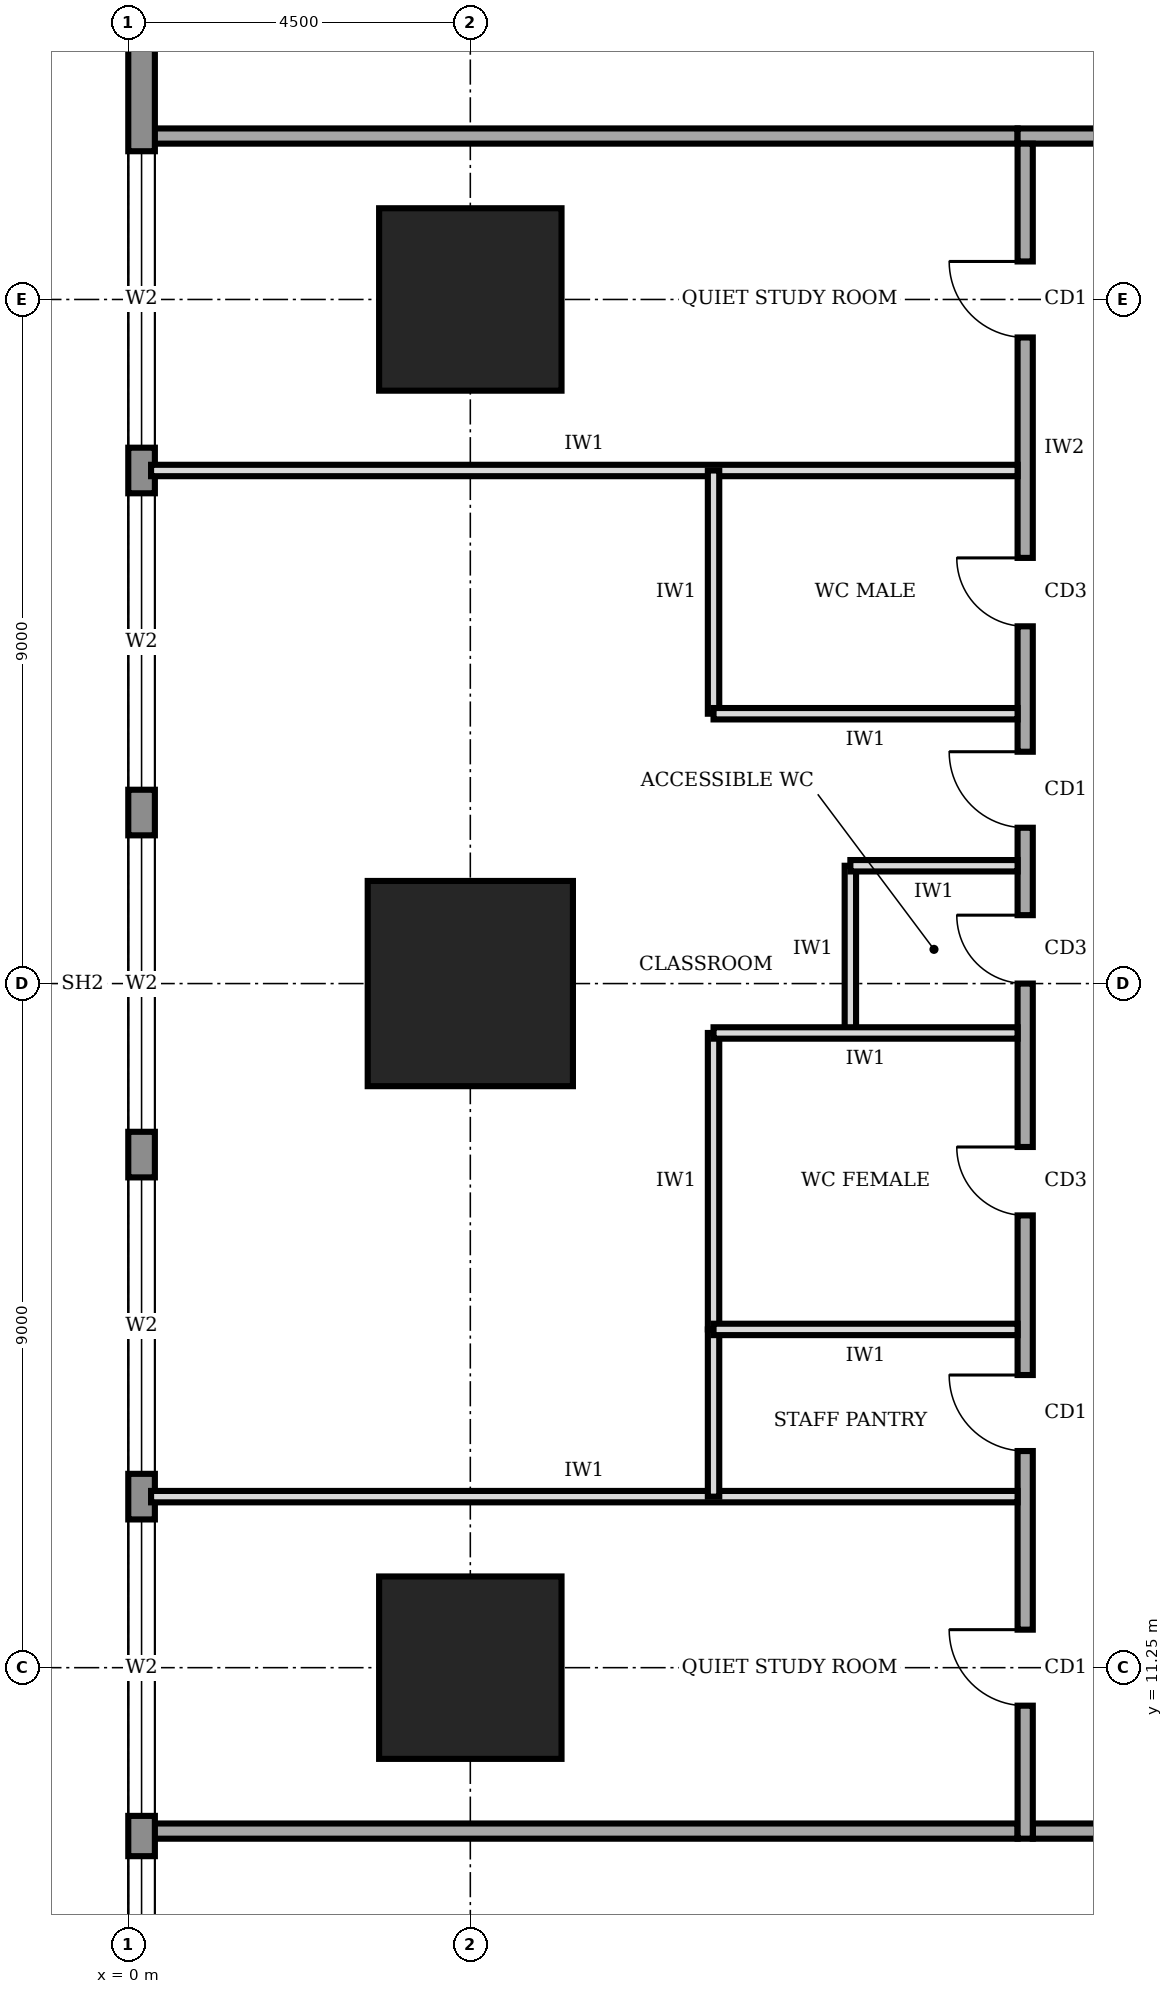
"""IFC4 building model, lengths in metres.
Left out: names, types, materials, properties, quantities, classifications, styles, units other than length and angle.
Written with IfcOpenShell. Run it as: python <this file> out.ifc"""

import sys

from ifc_helpers import new_model, si_unit, direction, frame, frame_2d, origin, origin_2d, place, context, subcontext, project, spatial, rectangle, extrude, element, fill, save


model = new_model("IFC4")
c1 = context("Model", 3, precision=1e-05, world=origin(), true_north=direction((0.0, 1.0)))
c2 = subcontext(c1, "Body", "Model", "MODEL_VIEW")
j1 = project(units=[si_unit("LENGTHUNIT", "METRE"), si_unit("PLANEANGLEUNIT", "RADIAN")], contexts=[c1])
p1 = place(None, origin())
s1 = spatial("IfcSite", under=j1, at=p1, CompositionType="ELEMENT")
p2 = place(p1, origin())
s2 = spatial("IfcBuilding", under=s1, at=p2, CompositionType="ELEMENT")
p3 = place(p2, frame((0.0, 0.0, 61.0)))
s3 = spatial("IfcBuildingStorey", under=s2, at=p3, CompositionType="ELEMENT", Elevation=61.0)
p4 = place(p3, frame((4.5, 11.25, 0.0), z_axis=(0.0, 0.0, 1.0), x_axis=(1.0, 0.0, 0.0)))
e1 = element("IfcColumn", 1, at=p4, inside=s3, PredefinedType="COLUMN", context=c2, shape_type="SweptSolid", body=[
    extrude(rectangle(XDim=2.4, YDim=2.4, at=origin_2d()), origin(), (0.0, 0.0, 1.0), 4.0),
])
p5 = place(p3, frame((4.5, 20.25, 0.0), z_axis=(0.0, 0.0, 1.0), x_axis=(1.0, 0.0, 0.0)))
e2 = element("IfcColumn", 2, at=p5, inside=s3, PredefinedType="COLUMN", context=c2, shape_type="SweptSolid", body=[
    extrude(rectangle(XDim=2.7, YDim=2.7, at=origin_2d()), origin(), (0.0, 0.0, 1.0), 4.0),
])
p6 = place(p3, frame((4.5, 29.25, 0.0), z_axis=(0.0, 0.0, 1.0), x_axis=(1.0, 0.0, 0.0)))
e3 = element("IfcColumn", 3, at=p6, inside=s3, PredefinedType="COLUMN", context=c2, shape_type="SweptSolid", body=[
    extrude(rectangle(XDim=2.4, YDim=2.4, at=origin_2d()), origin(), (0.0, 0.0, 1.0), 4.0),
])
p7 = place(p3, frame((0.175, 35.98, 0.0), z_axis=(0.0, 0.0, 1.0), x_axis=(0.0, -1.0, 0.0)))
e4 = element("IfcWall", 4, at=p7, inside=s3, PredefinedType="STANDARD", context=c2, shape_type="SweptSolid", body=[
    extrude(rectangle(XDim=31.46, YDim=0.35, at=frame_2d((15.73, 0.0))), origin(), (0.0, 0.0, 1.0), 3.75),
])
p8 = place(p7, frame((27.21, 0.0, 0.6)))
e5 = element("IfcOpeningElement", 5, at=p8, cuts=e4, PredefinedType="OPENING", context=c2, shape_type="SweptSolid", body=[
    extrude(rectangle(XDim=3.9, YDim=2.6, at=frame_2d((1.95, 1.3))), frame((0.0, 0.185, 0.0), z_axis=(0.0, -1.0, 0.0), x_axis=(1.0, 0.0, 0.0)), (0.0, 0.0, 1.0), 0.37),
])
p9 = place(p7, frame((22.78, 0.0, 0.6)))
e6 = element("IfcOpeningElement", 6, at=p9, cuts=e4, PredefinedType="OPENING", context=c2, shape_type="SweptSolid", body=[
    extrude(rectangle(XDim=3.9, YDim=2.6, at=frame_2d((1.95, 1.3))), frame((0.0, 0.185, 0.0), z_axis=(0.0, -1.0, 0.0), x_axis=(1.0, 0.0, 0.0)), (0.0, 0.0, 1.0), 0.37),
])
p10 = place(p7, frame((18.28, 0.0, 0.6)))
e7 = element("IfcOpeningElement", 7, at=p10, cuts=e4, PredefinedType="OPENING", context=c2, shape_type="SweptSolid", body=[
    extrude(rectangle(XDim=3.9, YDim=2.6, at=frame_2d((1.95, 1.3))), frame((0.0, 0.185, 0.0), z_axis=(0.0, -1.0, 0.0), x_axis=(1.0, 0.0, 0.0)), (0.0, 0.0, 1.0), 0.37),
])
p11 = place(p7, frame((13.78, 0.0, 0.6)))
e8 = element("IfcOpeningElement", 8, at=p11, cuts=e4, PredefinedType="OPENING", context=c2, shape_type="SweptSolid", body=[
    extrude(rectangle(XDim=3.9, YDim=2.6, at=frame_2d((1.95, 1.3))), frame((0.0, 0.185, 0.0), z_axis=(0.0, -1.0, 0.0), x_axis=(1.0, 0.0, 0.0)), (0.0, 0.0, 1.0), 0.37),
])
p12 = place(p7, frame((9.28, 0.0, 0.6)))
e9 = element("IfcOpeningElement", 9, at=p12, cuts=e4, PredefinedType="OPENING", context=c2, shape_type="SweptSolid", body=[
    extrude(rectangle(XDim=3.9, YDim=2.6, at=frame_2d((1.95, 1.3))), frame((0.0, 0.185, 0.0), z_axis=(0.0, -1.0, 0.0), x_axis=(1.0, 0.0, 0.0)), (0.0, 0.0, 1.0), 0.37),
])
p13 = place(p7, frame((4.78, 0.0, 0.6)))
e10 = element("IfcOpeningElement", 10, at=p13, cuts=e4, PredefinedType="OPENING", context=c2, shape_type="SweptSolid", body=[
    extrude(rectangle(XDim=3.9, YDim=2.6, at=frame_2d((1.95, 1.3))), frame((0.0, 0.185, 0.0), z_axis=(0.0, -1.0, 0.0), x_axis=(1.0, 0.0, 0.0)), (0.0, 0.0, 1.0), 0.37),
])
p14 = place(p3, frame((11.9, 9.1, 0.0), z_axis=(0.0, 0.0, 1.0), x_axis=(1.0, 0.0, 0.0)))
e11 = element("IfcWall", 11, at=p14, inside=s3, PredefinedType="SOLIDWALL", context=c2, shape_type="SweptSolid", body=[
    extrude(rectangle(XDim=18.4, YDim=0.2, at=frame_2d((9.2, 0.0))), origin(), (0.0, 0.0, 1.0), 3.75),
])
p15 = place(p14, frame((2.25, 0.0, 0.0)))
e12 = element("IfcOpeningElement", 12, at=p15, cuts=e11, PredefinedType="OPENING", context=c2, shape_type="SweptSolid", body=[
    extrude(rectangle(XDim=1.4, YDim=2.1, at=frame_2d((0.7, 1.05))), frame((0.0, 0.11, 0.0), z_axis=(0.0, -1.0, 0.0), x_axis=(1.0, 0.0, 0.0)), (0.0, 0.0, 1.0), 0.22),
])
p16 = place(p14, frame((7.85, 0.0, 0.0)))
e13 = element("IfcOpeningElement", 13, at=p16, cuts=e11, PredefinedType="OPENING", context=c2, shape_type="SweptSolid", body=[
    extrude(rectangle(XDim=1.0, YDim=2.1, at=frame_2d((0.5, 1.05))), frame((0.0, 0.11, 0.0), z_axis=(0.0, -1.0, 0.0), x_axis=(1.0, 0.0, 0.0)), (0.0, 0.0, 1.0), 0.22),
])
p17 = place(p14, frame((13.8, 0.0, 0.0)))
e14 = element("IfcOpeningElement", 14, at=p17, cuts=e11, PredefinedType="OPENING", context=c2, shape_type="SweptSolid", body=[
    extrude(rectangle(XDim=1.4, YDim=2.1, at=frame_2d((0.7, 1.05))), frame((0.0, 0.11, 0.0), z_axis=(0.0, -1.0, 0.0), x_axis=(1.0, 0.0, 0.0)), (0.0, 0.0, 1.0), 0.22),
])
p18 = place(p3, frame((30.1, 31.4, 0.0), z_axis=(0.0, 0.0, 1.0), x_axis=(-1.0, 0.0, 0.0)))
e15 = element("IfcWall", 15, at=p18, inside=s3, PredefinedType="SOLIDWALL", context=c2, shape_type="SweptSolid", body=[
    extrude(rectangle(XDim=18.4, YDim=0.2, at=frame_2d((9.2, 0.0))), origin(), (0.0, 0.0, 1.0), 3.75),
])
p19 = place(p18, frame((14.55, 0.0, 0.0)))
e16 = element("IfcOpeningElement", 16, at=p19, cuts=e15, PredefinedType="OPENING", context=c2, shape_type="SweptSolid", body=[
    extrude(rectangle(XDim=1.4, YDim=2.1, at=frame_2d((0.7, 1.05))), frame((0.0, 0.11, 0.0), z_axis=(0.0, -1.0, 0.0), x_axis=(1.0, 0.0, 0.0)), (0.0, 0.0, 1.0), 0.22),
])
p20 = place(p18, frame((7.1, 0.0, 0.0)))
e17 = element("IfcOpeningElement", 17, at=p20, cuts=e15, PredefinedType="OPENING", context=c2, shape_type="SweptSolid", body=[
    extrude(rectangle(XDim=1.0, YDim=2.1, at=frame_2d((0.5, 1.05))), frame((0.0, 0.11, 0.0), z_axis=(0.0, -1.0, 0.0), x_axis=(1.0, 0.0, 0.0)), (0.0, 0.0, 1.0), 0.22),
])
p21 = place(p18, frame((0.55, 0.0, 0.0)))
e18 = element("IfcOpeningElement", 18, at=p21, cuts=e15, PredefinedType="OPENING", context=c2, shape_type="SweptSolid", body=[
    extrude(rectangle(XDim=1.8, YDim=2.1, at=frame_2d((0.9, 1.05))), frame((0.0, 0.11, 0.0), z_axis=(0.0, -1.0, 0.0), x_axis=(1.0, 0.0, 0.0)), (0.0, 0.0, 1.0), 0.22),
])
p22 = place(p3, frame((11.8, 31.3, 0.0), z_axis=(0.0, 0.0, 1.0), x_axis=(0.0, -1.0, 0.0)))
e19 = element("IfcWall", 19, at=p22, inside=s3, PredefinedType="SOLIDWALL", context=c2, shape_type="SweptSolid", body=[
    extrude(rectangle(XDim=22.3, YDim=0.2, at=frame_2d((11.15, 0.0))), origin(), (0.0, 0.0, 1.0), 3.75),
])
p23 = place(p22, frame((19.55, 0.0, 0.0)))
e20 = element("IfcOpeningElement", 20, at=p23, cuts=e19, PredefinedType="OPENING", context=c2, shape_type="SweptSolid", body=[
    extrude(rectangle(XDim=1.0, YDim=2.1, at=frame_2d((0.5, 1.05))), frame((0.0, 0.11, 0.0), z_axis=(0.0, -1.0, 0.0), x_axis=(1.0, 0.0, 0.0)), (0.0, 0.0, 1.0), 0.22),
])
p24 = place(p22, frame((16.2, 0.0, 0.0)))
e21 = element("IfcOpeningElement", 21, at=p24, cuts=e19, PredefinedType="OPENING", context=c2, shape_type="SweptSolid", body=[
    extrude(rectangle(XDim=1.0, YDim=2.1, at=frame_2d((0.5, 1.05))), frame((0.0, 0.11, 0.0), z_axis=(0.0, -1.0, 0.0), x_axis=(1.0, 0.0, 0.0)), (0.0, 0.0, 1.0), 0.22),
])
p25 = place(p22, frame((13.2, 0.0, 0.0)))
e22 = element("IfcOpeningElement", 22, at=p25, cuts=e19, PredefinedType="OPENING", context=c2, shape_type="SweptSolid", body=[
    extrude(rectangle(XDim=0.9, YDim=2.1, at=frame_2d((0.45, 1.05))), frame((0.0, 0.11, 0.0), z_axis=(0.0, -1.0, 0.0), x_axis=(1.0, 0.0, 0.0)), (0.0, 0.0, 1.0), 0.22),
])
p26 = place(p22, frame((10.15, 0.0, 0.0)))
e23 = element("IfcOpeningElement", 23, at=p26, cuts=e19, PredefinedType="OPENING", context=c2, shape_type="SweptSolid", body=[
    extrude(rectangle(XDim=0.9, YDim=2.1, at=frame_2d((0.45, 1.05))), frame((0.0, 0.11, 0.0), z_axis=(0.0, -1.0, 0.0), x_axis=(1.0, 0.0, 0.0)), (0.0, 0.0, 1.0), 0.22),
])
p27 = place(p22, frame((5.45, 0.0, 0.0)))
e24 = element("IfcOpeningElement", 24, at=p27, cuts=e19, PredefinedType="OPENING", context=c2, shape_type="SweptSolid", body=[
    extrude(rectangle(XDim=0.9, YDim=2.1, at=frame_2d((0.45, 1.05))), frame((0.0, 0.11, 0.0), z_axis=(0.0, -1.0, 0.0), x_axis=(1.0, 0.0, 0.0)), (0.0, 0.0, 1.0), 0.22),
])
p28 = place(p22, frame((8.0, 0.0, 0.0)))
e25 = element("IfcOpeningElement", 25, at=p28, cuts=e19, PredefinedType="OPENING", context=c2, shape_type="SweptSolid", body=[
    extrude(rectangle(XDim=1.0, YDim=2.1, at=frame_2d((0.5, 1.05))), frame((0.0, 0.11, 0.0), z_axis=(0.0, -1.0, 0.0), x_axis=(1.0, 0.0, 0.0)), (0.0, 0.0, 1.0), 0.22),
])
p29 = place(p22, frame((1.55, 0.0, 0.0)))
e26 = element("IfcOpeningElement", 26, at=p29, cuts=e19, PredefinedType="OPENING", context=c2, shape_type="SweptSolid", body=[
    extrude(rectangle(XDim=1.0, YDim=2.1, at=frame_2d((0.5, 1.05))), frame((0.0, 0.11, 0.0), z_axis=(0.0, -1.0, 0.0), x_axis=(1.0, 0.0, 0.0)), (0.0, 0.0, 1.0), 0.22),
])
for number, where, z_axis, x_axis in (
    (27, (0.3, 9.1, 0.0), (0.0, 0.0, 1.0), (1.0, 0.0, 0.0)),
    (28, (0.3, 31.4, 0.0), (0.0, 0.0, 1.0), (1.0, 0.0, 0.0)),
):
    element("IfcWall", number, at=place(p3, frame(where, z_axis=z_axis, x_axis=x_axis)), inside=s3, PredefinedType="SOLIDWALL", context=c2, shape_type="SweptSolid", body=[
        extrude(rectangle(XDim=11.4, YDim=0.2, at=frame_2d((5.7, 0.0))), origin(), (0.0, 0.0, 1.0), 3.75),
    ])
for number, where, z_axis, x_axis in (
    (29, (0.3, 13.5, 0.0), (0.0, 0.0, 1.0), (1.0, 0.0, 0.0)),
    (30, (0.3, 27.0, 0.0), (0.0, 0.0, 1.0), (1.0, 0.0, 0.0)),
):
    element("IfcWall", number, at=place(p3, frame(where, z_axis=z_axis, x_axis=x_axis)), inside=s3, PredefinedType="PARTITIONING", context=c2, shape_type="SweptSolid", body=[
        extrude(rectangle(XDim=11.4, YDim=0.15, at=frame_2d((5.7, 0.0))), origin(), (0.0, 0.0, 1.0), 3.75),
    ])
p30 = place(p3, frame((11.7, 15.7, 0.0), z_axis=(0.0, 0.0, 1.0), x_axis=(-1.0, 0.0, 0.0)))
e31 = element("IfcWall", 31, at=p30, inside=s3, PredefinedType="PARTITIONING", context=c2, shape_type="SweptSolid", body=[
    extrude(rectangle(XDim=4.0, YDim=0.15, at=frame_2d((2.0, 0.0))), origin(), (0.0, 0.0, 1.0), 3.75),
])
p31 = place(p3, frame((11.7, 19.6, 0.0), z_axis=(0.0, 0.0, 1.0), x_axis=(-1.0, 0.0, 0.0)))
e32 = element("IfcWall", 32, at=p31, inside=s3, PredefinedType="PARTITIONING", context=c2, shape_type="SweptSolid", body=[
    extrude(rectangle(XDim=4.0, YDim=0.15, at=frame_2d((2.0, 0.0))), origin(), (0.0, 0.0, 1.0), 2.85),
])
p32 = place(p3, frame((11.7, 21.8, 0.0), z_axis=(0.0, 0.0, 1.0), x_axis=(-1.0, 0.0, 0.0)))
e33 = element("IfcWall", 33, at=p32, inside=s3, PredefinedType="PARTITIONING", context=c2, shape_type="SweptSolid", body=[
    extrude(rectangle(XDim=2.2, YDim=0.15, at=frame_2d((1.1, 0.0))), origin(), (0.0, 0.0, 1.0), 3.75),
])
p33 = place(p3, frame((11.7, 23.8, 0.0), z_axis=(0.0, 0.0, 1.0), x_axis=(-1.0, 0.0, 0.0)))
e34 = element("IfcWall", 34, at=p33, inside=s3, PredefinedType="PARTITIONING", context=c2, shape_type="SweptSolid", body=[
    extrude(rectangle(XDim=4.0, YDim=0.15, at=frame_2d((2.0, 0.0))), origin(), (0.0, 0.0, 1.0), 3.75),
])
p34 = place(p3, frame((7.7, 13.5, 0.0), z_axis=(0.0, 0.0, 1.0), x_axis=(0.0, 1.0, 0.0)))
e35 = element("IfcWall", 35, at=p34, inside=s3, PredefinedType="PARTITIONING", context=c2, shape_type="SweptSolid", body=[
    extrude(rectangle(XDim=2.2, YDim=0.15, at=frame_2d((1.1, 0.0))), origin(), (0.0, 0.0, 1.0), 3.75),
])
p35 = place(p3, frame((7.7, 15.7, 0.0), z_axis=(0.0, 0.0, 1.0), x_axis=(0.0, 1.0, 0.0)))
e36 = element("IfcWall", 36, at=p35, inside=s3, PredefinedType="PARTITIONING", context=c2, shape_type="SweptSolid", body=[
    extrude(rectangle(XDim=3.9, YDim=0.15, at=frame_2d((1.95, 0.0))), origin(), (0.0, 0.0, 1.0), 3.75),
])
p36 = place(p3, frame((9.5, 19.6, 0.0), z_axis=(0.0, 0.0, 1.0), x_axis=(0.0, 1.0, 0.0)))
e37 = element("IfcWall", 37, at=p36, inside=s3, PredefinedType="PARTITIONING", context=c2, shape_type="SweptSolid", body=[
    extrude(rectangle(XDim=2.2, YDim=0.15, at=frame_2d((1.1, 0.0))), origin(), (0.0, 0.0, 1.0), 3.75),
])
p37 = place(p3, frame((7.7, 23.8, 0.0), z_axis=(0.0, 0.0, 1.0), x_axis=(0.0, 1.0, 0.0)))
e38 = element("IfcWall", 38, at=p37, inside=s3, PredefinedType="PARTITIONING", context=c2, shape_type="SweptSolid", body=[
    extrude(rectangle(XDim=3.2, YDim=0.15, at=frame_2d((1.6, 0.0))), origin(), (0.0, 0.0, 1.0), 3.75),
])
p38 = place(p8, origin())
e39 = element("IfcWindow", 39, at=p38, inside=s3, PartitioningType="SINGLE_PANEL", PredefinedType="WINDOW", context=c2, shape_type="SweptSolid", body=[
    extrude(rectangle(XDim=3.9, YDim=2.6, at=frame_2d((1.95, 1.3))), frame((0.0, 0.03, 0.0), z_axis=(0.0, -1.0, 0.0), x_axis=(1.0, 0.0, 0.0)), (0.0, 0.0, 1.0), 0.06),
])
fill(e5, e39)
p39 = place(p9, origin())
e40 = element("IfcWindow", 40, at=p39, inside=s3, PartitioningType="SINGLE_PANEL", PredefinedType="WINDOW", context=c2, shape_type="SweptSolid", body=[
    extrude(rectangle(XDim=3.9, YDim=2.6, at=frame_2d((1.95, 1.3))), frame((0.0, 0.03, 0.0), z_axis=(0.0, -1.0, 0.0), x_axis=(1.0, 0.0, 0.0)), (0.0, 0.0, 1.0), 0.06),
])
fill(e6, e40)
p40 = place(p10, origin())
e41 = element("IfcWindow", 41, at=p40, inside=s3, PartitioningType="SINGLE_PANEL", PredefinedType="WINDOW", context=c2, shape_type="SweptSolid", body=[
    extrude(rectangle(XDim=3.9, YDim=2.6, at=frame_2d((1.95, 1.3))), frame((0.0, 0.03, 0.0), z_axis=(0.0, -1.0, 0.0), x_axis=(1.0, 0.0, 0.0)), (0.0, 0.0, 1.0), 0.06),
])
fill(e7, e41)
p41 = place(p11, origin())
e42 = element("IfcWindow", 42, at=p41, inside=s3, PartitioningType="SINGLE_PANEL", PredefinedType="WINDOW", context=c2, shape_type="SweptSolid", body=[
    extrude(rectangle(XDim=3.9, YDim=2.6, at=frame_2d((1.95, 1.3))), frame((0.0, 0.03, 0.0), z_axis=(0.0, -1.0, 0.0), x_axis=(1.0, 0.0, 0.0)), (0.0, 0.0, 1.0), 0.06),
])
fill(e8, e42)
p42 = place(p12, origin())
e43 = element("IfcWindow", 43, at=p42, inside=s3, PartitioningType="SINGLE_PANEL", PredefinedType="WINDOW", context=c2, shape_type="SweptSolid", body=[
    extrude(rectangle(XDim=3.9, YDim=2.6, at=frame_2d((1.95, 1.3))), frame((0.0, 0.03, 0.0), z_axis=(0.0, -1.0, 0.0), x_axis=(1.0, 0.0, 0.0)), (0.0, 0.0, 1.0), 0.06),
])
fill(e9, e43)
p43 = place(p13, origin())
e44 = element("IfcWindow", 44, at=p43, inside=s3, PartitioningType="SINGLE_PANEL", PredefinedType="WINDOW", context=c2, shape_type="SweptSolid", body=[
    extrude(rectangle(XDim=3.9, YDim=2.6, at=frame_2d((1.95, 1.3))), frame((0.0, 0.03, 0.0), z_axis=(0.0, -1.0, 0.0), x_axis=(1.0, 0.0, 0.0)), (0.0, 0.0, 1.0), 0.06),
])
fill(e10, e44)
p44 = place(p23, frame((1.0, 0.0, 0.0), z_axis=(0.0, 0.0, 1.0), x_axis=(-1.0, 0.0, 0.0)))
e45 = element("IfcDoor", 45, at=p44, inside=s3, OperationType="SINGLE_SWING_RIGHT", PredefinedType="DOOR", context=c2, shape_type="SweptSolid", body=[
    extrude(rectangle(XDim=1.0, YDim=2.1, at=frame_2d((0.5, 1.05))), frame((0.0, 0.025, 0.0), z_axis=(0.0, -1.0, 0.0), x_axis=(1.0, 0.0, 0.0)), (0.0, 0.0, 1.0), 0.05),
])
fill(e20, e45)
p45 = place(p24, frame((1.0, 0.0, 0.0), z_axis=(0.0, 0.0, 1.0), x_axis=(-1.0, 0.0, 0.0)))
e46 = element("IfcDoor", 46, at=p45, inside=s3, OperationType="SINGLE_SWING_RIGHT", PredefinedType="DOOR", context=c2, shape_type="SweptSolid", body=[
    extrude(rectangle(XDim=1.0, YDim=2.1, at=frame_2d((0.5, 1.05))), frame((0.0, 0.025, 0.0), z_axis=(0.0, -1.0, 0.0), x_axis=(1.0, 0.0, 0.0)), (0.0, 0.0, 1.0), 0.05),
])
fill(e21, e46)
p46 = place(p25, frame((0.9, 0.0, 0.0), z_axis=(0.0, 0.0, 1.0), x_axis=(-1.0, 0.0, 0.0)))
e47 = element("IfcDoor", 47, at=p46, inside=s3, OperationType="SINGLE_SWING_RIGHT", PredefinedType="DOOR", context=c2, shape_type="SweptSolid", body=[
    extrude(rectangle(XDim=0.9, YDim=2.1, at=frame_2d((0.45, 1.05))), frame((0.0, 0.025, 0.0), z_axis=(0.0, -1.0, 0.0), x_axis=(1.0, 0.0, 0.0)), (0.0, 0.0, 1.0), 0.05),
])
fill(e22, e47)
p47 = place(p26, frame((0.9, 0.0, 0.0), z_axis=(0.0, 0.0, 1.0), x_axis=(-1.0, 0.0, 0.0)))
e48 = element("IfcDoor", 48, at=p47, inside=s3, OperationType="SINGLE_SWING_RIGHT", PredefinedType="DOOR", context=c2, shape_type="SweptSolid", body=[
    extrude(rectangle(XDim=0.9, YDim=2.1, at=frame_2d((0.45, 1.05))), frame((0.0, 0.025, 0.0), z_axis=(0.0, -1.0, 0.0), x_axis=(1.0, 0.0, 0.0)), (0.0, 0.0, 1.0), 0.05),
])
fill(e23, e48)
p48 = place(p27, frame((0.9, 0.0, 0.0), z_axis=(0.0, 0.0, 1.0), x_axis=(-1.0, 0.0, 0.0)))
e49 = element("IfcDoor", 49, at=p48, inside=s3, OperationType="SINGLE_SWING_RIGHT", PredefinedType="DOOR", context=c2, shape_type="SweptSolid", body=[
    extrude(rectangle(XDim=0.9, YDim=2.1, at=frame_2d((0.45, 1.05))), frame((0.0, 0.025, 0.0), z_axis=(0.0, -1.0, 0.0), x_axis=(1.0, 0.0, 0.0)), (0.0, 0.0, 1.0), 0.05),
])
fill(e24, e49)
p49 = place(p28, frame((1.0, 0.0, 0.0), z_axis=(0.0, 0.0, 1.0), x_axis=(-1.0, 0.0, 0.0)))
e50 = element("IfcDoor", 50, at=p49, inside=s3, OperationType="SINGLE_SWING_RIGHT", PredefinedType="DOOR", context=c2, shape_type="SweptSolid", body=[
    extrude(rectangle(XDim=1.0, YDim=2.1, at=frame_2d((0.5, 1.05))), frame((0.0, 0.025, 0.0), z_axis=(0.0, -1.0, 0.0), x_axis=(1.0, 0.0, 0.0)), (0.0, 0.0, 1.0), 0.05),
])
fill(e25, e50)
p50 = place(p29, frame((1.0, 0.0, 0.0), z_axis=(0.0, 0.0, 1.0), x_axis=(-1.0, 0.0, 0.0)))
e51 = element("IfcDoor", 51, at=p50, inside=s3, OperationType="SINGLE_SWING_RIGHT", PredefinedType="DOOR", context=c2, shape_type="SweptSolid", body=[
    extrude(rectangle(XDim=1.0, YDim=2.1, at=frame_2d((0.5, 1.05))), frame((0.0, 0.025, 0.0), z_axis=(0.0, -1.0, 0.0), x_axis=(1.0, 0.0, 0.0)), (0.0, 0.0, 1.0), 0.05),
])
fill(e26, e51)
save(model, sys.argv[1])
